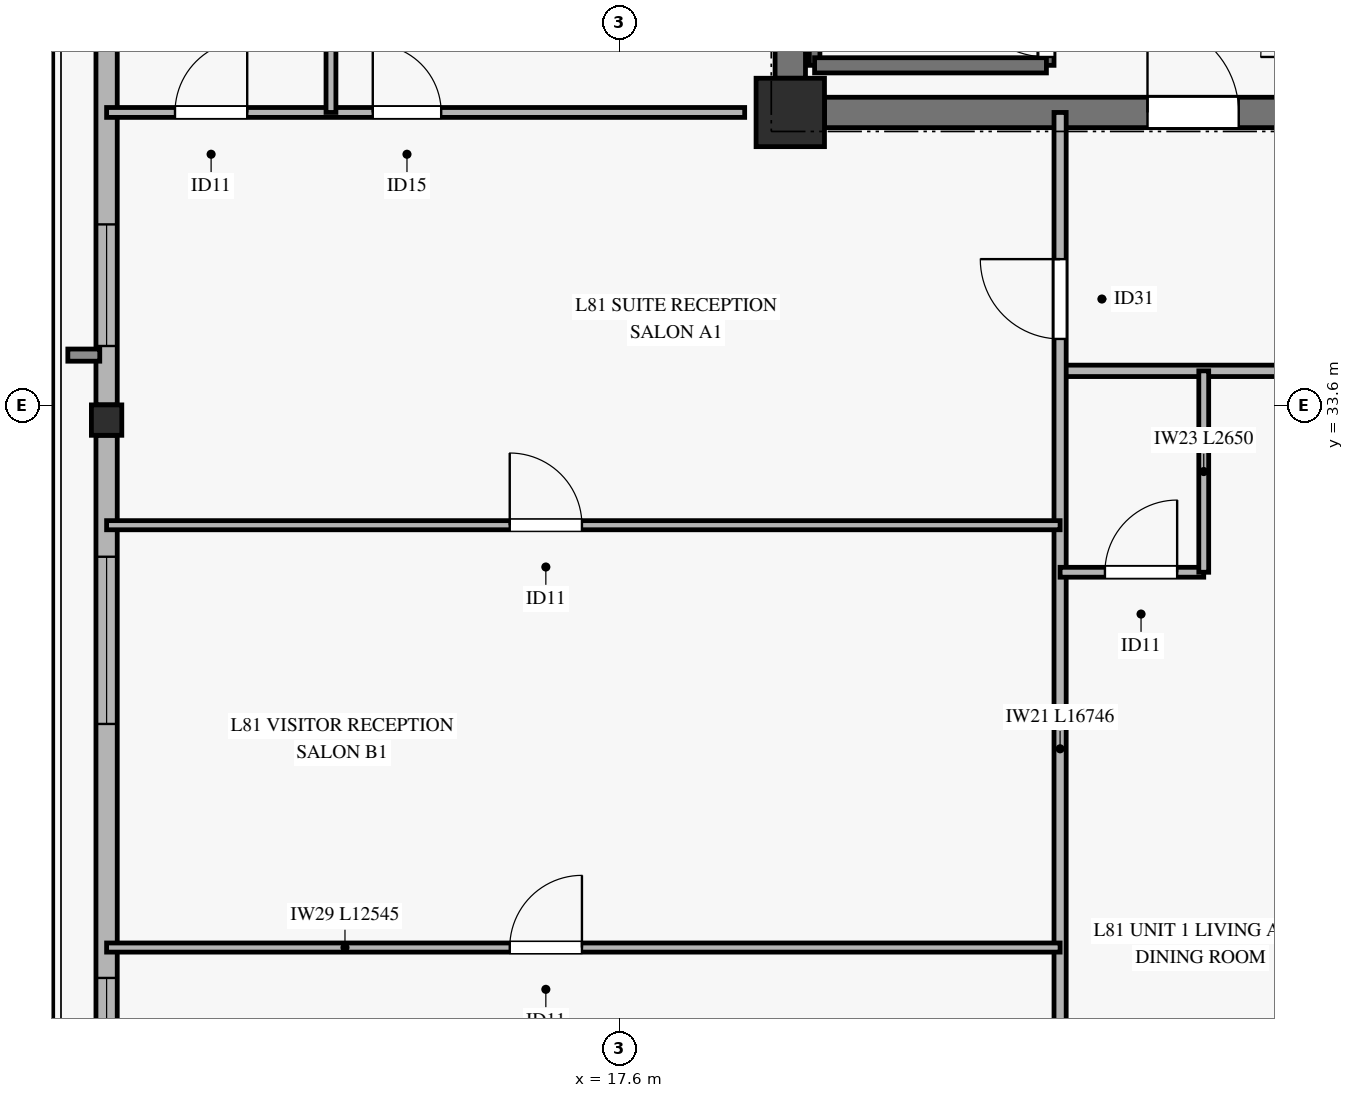
"""IFC4 building model, lengths in metres.
Left out: names, types, materials, properties, quantities, classifications, styles, units other than length and angle.
Written with IfcOpenShell. Run it as: python <this file> out.ifc"""

import sys

from ifc_helpers import new_model, si_unit, direction, frame, frame_2d, origin, origin_2d, place, context, subcontext, project, spatial, rectangle, hollow_rectangle, extrude, source, transform, mapped, element, fill, save


model = new_model("IFC4")
c1 = context("Model", 3, precision=1e-05, world=origin(), true_north=direction((0.0, 1.0)))
c2 = subcontext(c1, "Body", "Model", "MODEL_VIEW")
j1 = project(units=[si_unit("LENGTHUNIT", "METRE"), si_unit("PLANEANGLEUNIT", "RADIAN")], contexts=[c1])
p1 = place(None, origin())
s1 = spatial("IfcSite", under=j1, at=p1, CompositionType="ELEMENT")
p2 = place(p1, origin())
s2 = spatial("IfcBuilding", under=s1, at=p2, CompositionType="ELEMENT")
p3 = place(p2, frame((0.0, 0.0, 314.2)))
s3 = spatial("IfcBuildingStorey", under=s2, at=p3, CompositionType="ELEMENT", Elevation=314.2)
m1 = source(origin(), c2, "Body", "SweptSolid", [
    extrude(rectangle(XDim=0.9, YDim=0.9, at=origin_2d()), origin(), (0.0, 0.0, 1.0), 3.185),
])
p4 = place(p3, frame((19.85, 37.45, 0.0), z_axis=(0.0, 0.0, 1.0), x_axis=(1.0, 0.0, 0.0)))
e1 = element("IfcColumn", 1, at=p4, inside=s3, PredefinedType="PILASTER", context=c2, shape_type="MappedRepresentation", body=[
    mapped(m1, transform((0.0, 0.0, 0.0), x_axis=(1.0, 0.0, 0.0), y_axis=(0.0, 1.0, 0.0), z_axis=(0.0, 0.0, 1.0), scale=1.0)),
])
p5 = place(p3, frame((20.3, 37.45, 0.0), z_axis=(0.0, 0.0, 1.0), x_axis=(1.0, 0.0, 0.0)))
e2 = element("IfcWall", 2, at=p5, inside=s3, PredefinedType="SHEAR", context=c2, shape_type="SweptSolid", body=[
    extrude(rectangle(XDim=10.05, YDim=0.4, at=frame_2d((5.025, 0.0))), origin(), (0.0, 0.0, 1.0), 3.185),
])
p6 = place(p5, frame((4.25, 0.0, 0.0)))
e3 = element("IfcOpeningElement", 3, at=p6, cuts=e2, PredefinedType="OPENING", context=c2, shape_type="SweptSolid", body=[
    extrude(rectangle(XDim=1.2, YDim=2.15, at=frame_2d((0.6, 1.075))), frame((0.0, 0.21, 0.0), z_axis=(0.0, -1.0, 0.0), x_axis=(1.0, 0.0, 0.0)), (0.0, 0.0, 1.0), 0.42),
])
p7 = place(p3, frame((19.85, 37.9, 0.0), z_axis=(0.0, 0.0, 1.0), x_axis=(0.0, 1.0, 0.0)))
e4 = element("IfcWall", 4, at=p7, inside=s3, PredefinedType="SHEAR", context=c2, shape_type="SweptSolid", body=[
    extrude(rectangle(XDim=8.2, YDim=0.4, at=frame_2d((4.1, 0.0))), origin(), (0.0, 0.0, 1.0), 3.185),
])
m2 = source(origin(), c2, "Body", "SweptSolid", [
    extrude(hollow_rectangle(XDim=0.4, YDim=0.4, WallThickness=0.02, at=origin_2d()), origin(), (0.0, 0.0, 1.0), 3.185),
])
p8 = place(p3, frame((10.855, 33.402, 0.0), z_axis=(0.0, 0.0, 1.0), x_axis=(1.0, 0.0, 0.0)))
e5 = element("IfcColumn", 5, at=p8, inside=s3, PredefinedType="COLUMN", context=c2, shape_type="MappedRepresentation", body=[
    mapped(m2, transform((0.0, 0.0, 0.0), x_axis=(1.0, 0.0, 0.0), y_axis=(0.0, 1.0, 0.0), z_axis=(0.0, 0.0, 1.0), scale=1.0)),
])
p9 = place(p3, frame((10.855, 23.042, 0.0), z_axis=(0.0, 0.0, 1.0), x_axis=(0.0, 1.0, 0.0)))
e6 = element("IfcWall", 6, at=p9, inside=s3, PredefinedType="SOLIDWALL", context=c2, shape_type="SweptSolid", body=[
    extrude(rectangle(XDim=10.16, YDim=0.28, at=frame_2d((5.08, 0.0))), origin(), (0.0, 0.0, 1.0), 2.815),
])
p10 = place(p9, frame((0.82, 0.0, 0.45)))
e7 = element("IfcOpeningElement", 7, at=p10, cuts=e6, PredefinedType="OPENING", context=c2, shape_type="SweptSolid", body=[
    extrude(rectangle(XDim=2.2, YDim=2.1, at=frame_2d((1.1, 1.05))), frame((0.0, 0.15, 0.0), z_axis=(0.0, -1.0, 0.0), x_axis=(1.0, 0.0, 0.0)), (0.0, 0.0, 1.0), 0.3),
])
p11 = place(p9, frame((6.362, 0.0, 0.45)))
e8 = element("IfcOpeningElement", 8, at=p11, cuts=e6, PredefinedType="OPENING", context=c2, shape_type="SweptSolid", body=[
    extrude(rectangle(XDim=2.2, YDim=2.1, at=frame_2d((1.1, 1.05))), frame((0.0, 0.15, 0.0), z_axis=(0.0, -1.0, 0.0), x_axis=(1.0, 0.0, 0.0)), (0.0, 0.0, 1.0), 0.3),
])
p12 = place(p3, frame((10.855, 33.602, 0.0), z_axis=(0.0, 0.0, 1.0), x_axis=(0.0, 1.0, 0.0)))
e9 = element("IfcWall", 9, at=p12, inside=s3, PredefinedType="SOLIDWALL", context=c2, shape_type="SweptSolid", body=[
    extrude(rectangle(XDim=10.16, YDim=0.28, at=frame_2d((5.08, 0.0))), origin(), (0.0, 0.0, 1.0), 2.815),
])
p13 = place(p12, frame((0.775, 0.0, 0.45)))
e10 = element("IfcOpeningElement", 10, at=p13, cuts=e9, PredefinedType="OPENING", context=c2, shape_type="SweptSolid", body=[
    extrude(rectangle(XDim=1.6, YDim=2.0, at=frame_2d((0.8, 1.0))), frame((0.0, 0.15, 0.0), z_axis=(0.0, -1.0, 0.0), x_axis=(1.0, 0.0, 0.0)), (0.0, 0.0, 1.0), 0.3),
])
p14 = place(p3, frame((20.17, 38.07, 0.0), z_axis=(0.0, 0.0, 1.0), x_axis=(0.0, 1.0, 0.0)))
e11 = element("IfcWall", 11, at=p14, inside=s3, PredefinedType="SOLIDWALL", context=c2, shape_type="SweptSolid", body=[
    extrude(rectangle(XDim=7.25, YDim=0.14, at=frame_2d((3.625, 0.0))), origin(), (0.0, 0.0, 1.0), 3.4),
])
p15 = place(p3, frame((23.22, 38.07, 0.0), z_axis=(0.0, 0.0, 1.0), x_axis=(0.0, 1.0, 0.0)))
e12 = element("IfcWall", 12, at=p15, inside=s3, PredefinedType="SOLIDWALL", context=c2, shape_type="SweptSolid", body=[
    extrude(rectangle(XDim=7.25, YDim=0.2, at=frame_2d((3.625, 0.0))), origin(), (0.0, 0.0, 1.0), 3.4),
])
p16 = place(p15, frame((0.11, 0.0, 0.0)))
e13 = element("IfcOpeningElement", 13, at=p16, cuts=e12, PredefinedType="OPENING", context=c2, shape_type="SweptSolid", body=[
    extrude(rectangle(XDim=1.1, YDim=2.15, at=frame_2d((0.55, 1.075))), frame((0.0, 0.11, 0.0), z_axis=(0.0, -1.0, 0.0), x_axis=(1.0, 0.0, 0.0)), (0.0, 0.0, 1.0), 0.22),
])
p17 = place(p3, frame((20.17, 38.07, 0.0), z_axis=(0.0, 0.0, 1.0), x_axis=(1.0, 0.0, 0.0)))
e14 = element("IfcWall", 14, at=p17, inside=s3, PredefinedType="SOLIDWALL", context=c2, shape_type="SweptSolid", body=[
    extrude(rectangle(XDim=3.05, YDim=0.2, at=frame_2d((1.525, 0.0))), origin(), (0.0, 0.0, 1.0), 3.4),
])
p18 = place(p3, frame((23.4, 34.05, 0.0), z_axis=(0.0, 0.0, 1.0), x_axis=(1.0, 0.0, 0.0)))
e15 = element("IfcWall", 15, at=p18, inside=s3, PredefinedType="PARTITIONING", context=c2, shape_type="SweptSolid", body=[
    extrude(rectangle(XDim=20.9, YDim=0.15, at=frame_2d((10.45, 0.0))), origin(), (0.0, 0.0, 1.0), 2.47),
])
p19 = place(p18, frame((3.275, 0.0, 0.0)))
e16 = element("IfcOpeningElement", 16, at=p19, cuts=e15, PredefinedType="OPENING", context=c2, shape_type="SweptSolid", body=[
    extrude(rectangle(XDim=1.05, YDim=2.15, at=frame_2d((0.525, 1.075))), frame((0.0, 0.085, 0.0), z_axis=(0.0, -1.0, 0.0), x_axis=(1.0, 0.0, 0.0)), (0.0, 0.0, 1.0), 0.17),
])
p20 = place(p18, frame((10.775, 0.0, 0.0)))
e17 = element("IfcOpeningElement", 17, at=p20, cuts=e15, PredefinedType="OPENING", context=c2, shape_type="SweptSolid", body=[
    extrude(rectangle(XDim=1.05, YDim=2.15, at=frame_2d((0.525, 1.075))), frame((0.0, 0.085, 0.0), z_axis=(0.0, -1.0, 0.0), x_axis=(1.0, 0.0, 0.0)), (0.0, 0.0, 1.0), 0.17),
])
p21 = place(p18, frame((17.525, 0.0, 0.0)))
e18 = element("IfcOpeningElement", 18, at=p21, cuts=e15, PredefinedType="OPENING", context=c2, shape_type="SweptSolid", body=[
    extrude(rectangle(XDim=1.05, YDim=2.15, at=frame_2d((0.525, 1.075))), frame((0.0, 0.085, 0.0), z_axis=(0.0, -1.0, 0.0), x_axis=(1.0, 0.0, 0.0)), (0.0, 0.0, 1.0), 0.17),
])
p22 = place(p3, frame((23.4, 20.704, 0.0), z_axis=(0.0, 0.0, 1.0), x_axis=(0.0, 1.0, 0.0)))
e19 = element("IfcWall", 19, at=p22, inside=s3, PredefinedType="PARTITIONING", context=c2, shape_type="SweptSolid", body=[
    extrude(rectangle(XDim=16.746, YDim=0.16, at=frame_2d((8.373, 0.0))), origin(), (0.0, 0.0, 1.0), 2.77),
])
p23 = place(p22, frame((13.766, 0.0, 0.0)))
e20 = element("IfcOpeningElement", 20, at=p23, cuts=e19, PredefinedType="OPENING", context=c2, shape_type="SweptSolid", body=[
    extrude(rectangle(XDim=1.05, YDim=2.15, at=frame_2d((0.525, 1.075))), frame((0.0, 0.09, 0.0), z_axis=(0.0, -1.0, 0.0), x_axis=(1.0, 0.0, 0.0)), (0.0, 0.0, 1.0), 0.18),
])
p24 = place(p3, frame((10.855, 26.462, 0.0), z_axis=(0.0, 0.0, 1.0), x_axis=(1.0, 0.0, 0.0)))
e21 = element("IfcWall", 21, at=p24, inside=s3, PredefinedType="PARTITIONING", context=c2, shape_type="SweptSolid", body=[
    extrude(rectangle(XDim=12.545, YDim=0.12, at=frame_2d((6.272, 0.0))), origin(), (0.0, 0.0, 1.0), 2.47),
])
p25 = place(p24, frame((5.304, 0.0, 0.0)))
e22 = element("IfcOpeningElement", 22, at=p25, cuts=e21, PredefinedType="OPENING", context=c2, shape_type="SweptSolid", body=[
    extrude(rectangle(XDim=0.95, YDim=2.1, at=frame_2d((0.475, 1.05))), frame((0.0, 0.07, 0.0), z_axis=(0.0, -1.0, 0.0), x_axis=(1.0, 0.0, 0.0)), (0.0, 0.0, 1.0), 0.14),
])
p26 = place(p3, frame((10.855, 32.019, 0.0), z_axis=(0.0, 0.0, 1.0), x_axis=(1.0, 0.0, 0.0)))
e23 = element("IfcWall", 23, at=p26, inside=s3, PredefinedType="PARTITIONING", context=c2, shape_type="SweptSolid", body=[
    extrude(rectangle(XDim=12.545, YDim=0.12, at=frame_2d((6.272, 0.0))), origin(), (0.0, 0.0, 1.0), 2.47),
])
p27 = place(p26, frame((5.304, 0.0, 0.0)))
e24 = element("IfcOpeningElement", 24, at=p27, cuts=e23, PredefinedType="OPENING", context=c2, shape_type="SweptSolid", body=[
    extrude(rectangle(XDim=0.95, YDim=2.1, at=frame_2d((0.475, 1.05))), frame((0.0, 0.07, 0.0), z_axis=(0.0, -1.0, 0.0), x_axis=(1.0, 0.0, 0.0)), (0.0, 0.0, 1.0), 0.14),
])
p28 = place(p3, frame((23.4, 31.4, 0.0), z_axis=(0.0, 0.0, 1.0), x_axis=(1.0, 0.0, 0.0)))
e25 = element("IfcWall", 25, at=p28, inside=s3, PredefinedType="PARTITIONING", context=c2, shape_type="SweptSolid", body=[
    extrude(rectangle(XDim=1.89, YDim=0.13, at=frame_2d((0.945, 0.0))), origin(), (0.0, 0.0, 1.0), 3.185),
])
p29 = place(p28, frame((0.59, 0.0, 0.0)))
e26 = element("IfcOpeningElement", 26, at=p29, cuts=e25, PredefinedType="OPENING", context=c2, shape_type="SweptSolid", body=[
    extrude(rectangle(XDim=0.95, YDim=2.1, at=frame_2d((0.475, 1.05))), frame((0.0, 0.075, 0.0), z_axis=(0.0, -1.0, 0.0), x_axis=(1.0, 0.0, 0.0)), (0.0, 0.0, 1.0), 0.15),
])
p30 = place(p3, frame((25.29, 31.4, 0.0), z_axis=(0.0, 0.0, 1.0), x_axis=(0.0, 1.0, 0.0)))
e27 = element("IfcWall", 27, at=p30, inside=s3, PredefinedType="PARTITIONING", context=c2, shape_type="SweptSolid", body=[
    extrude(rectangle(XDim=2.65, YDim=0.13, at=frame_2d((1.325, 0.0))), origin(), (0.0, 0.0, 1.0), 2.77),
])
p31 = place(p3, frame((10.855, 37.45, 0.0), z_axis=(0.0, 0.0, 1.0), x_axis=(1.0, 0.0, 0.0)))
e28 = element("IfcWall", 28, at=p31, inside=s3, PredefinedType="PARTITIONING", context=c2, shape_type="SweptSolid", body=[
    extrude(rectangle(XDim=8.395, YDim=0.13, at=frame_2d((4.198, 0.0))), origin(), (0.0, 0.0, 1.0), 2.82),
])
p32 = place(p31, frame((0.9, 0.0, 0.0)))
e29 = element("IfcOpeningElement", 29, at=p32, cuts=e28, PredefinedType="OPENING", context=c2, shape_type="SweptSolid", body=[
    extrude(rectangle(XDim=0.95, YDim=2.1, at=frame_2d((0.475, 1.05))), frame((0.0, 0.075, 0.0), z_axis=(0.0, -1.0, 0.0), x_axis=(1.0, 0.0, 0.0)), (0.0, 0.0, 1.0), 0.15),
])
p33 = place(p31, frame((3.502, 0.0, 0.0)))
e30 = element("IfcOpeningElement", 30, at=p33, cuts=e28, PredefinedType="OPENING", context=c2, shape_type="SweptSolid", body=[
    extrude(rectangle(XDim=0.9, YDim=2.1, at=frame_2d((0.45, 1.05))), frame((0.0, 0.075, 0.0), z_axis=(0.0, -1.0, 0.0), x_axis=(1.0, 0.0, 0.0)), (0.0, 0.0, 1.0), 0.15),
])
p34 = place(p3, frame((13.807, 37.45, 0.0), z_axis=(0.0, 0.0, 1.0), x_axis=(0.0, 1.0, 0.0)))
e31 = element("IfcWall", 31, at=p34, inside=s3, PredefinedType="PARTITIONING", context=c2, shape_type="SweptSolid", body=[
    extrude(rectangle(XDim=8.8, YDim=0.13, at=frame_2d((4.4, 0.0))), origin(), (0.0, 0.0, 1.0), 3.185),
])
m3 = source(origin(), c2, "Body", "SweptSolid", [
    extrude(rectangle(XDim=2.2, YDim=2.1, at=frame_2d((1.1, 1.05))), frame((0.0, 0.03, 0.0), z_axis=(0.0, -1.0, 0.0), x_axis=(1.0, 0.0, 0.0)), (0.0, 0.0, 1.0), 0.06),
])
p35 = place(p10, origin())
e32 = element("IfcWindow", 32, at=p35, inside=s3, PartitioningType="SINGLE_PANEL", PredefinedType="WINDOW", context=c2, shape_type="MappedRepresentation", body=[
    mapped(m3, transform((0.0, 0.0, 0.0), x_axis=(1.0, 0.0, 0.0), y_axis=(0.0, 1.0, 0.0), z_axis=(0.0, 0.0, 1.0), scale=1.0)),
])
fill(e7, e32)
p36 = place(p11, origin())
e33 = element("IfcWindow", 33, at=p36, inside=s3, PartitioningType="SINGLE_PANEL", PredefinedType="WINDOW", context=c2, shape_type="MappedRepresentation", body=[
    mapped(m3, transform((0.0, 0.0, 0.0), x_axis=(1.0, 0.0, 0.0), y_axis=(0.0, 1.0, 0.0), z_axis=(0.0, 0.0, 1.0), scale=1.0)),
])
fill(e8, e33)
m4 = source(origin(), c2, "Body", "SweptSolid", [
    extrude(rectangle(XDim=1.6, YDim=2.0, at=frame_2d((0.8, 1.0))), frame((0.0, 0.03, 0.0), z_axis=(0.0, -1.0, 0.0), x_axis=(1.0, 0.0, 0.0)), (0.0, 0.0, 1.0), 0.06),
])
p37 = place(p13, origin())
e34 = element("IfcWindow", 34, at=p37, inside=s3, PartitioningType="SINGLE_PANEL", PredefinedType="WINDOW", context=c2, shape_type="MappedRepresentation", body=[
    mapped(m4, transform((0.0, 0.0, 0.0), x_axis=(1.0, 0.0, 0.0), y_axis=(0.0, 1.0, 0.0), z_axis=(0.0, 0.0, 1.0), scale=1.0)),
])
fill(e10, e34)
m5 = source(origin(), c2, "Body", "SweptSolid", [
    extrude(rectangle(XDim=1.1, YDim=2.15, at=frame_2d((0.55, 1.075))), frame((0.0, 0.025, 0.0), z_axis=(0.0, -1.0, 0.0), x_axis=(1.0, 0.0, 0.0)), (0.0, 0.0, 1.0), 0.05),
])
p38 = place(p16, origin())
e35 = element("IfcDoor", 35, at=p38, inside=s3, OperationType="SINGLE_SWING_RIGHT", PredefinedType="DOOR", context=c2, shape_type="MappedRepresentation", body=[
    mapped(m5, transform((0.0, 0.0, 0.0), x_axis=(1.0, 0.0, 0.0), y_axis=(0.0, 1.0, 0.0), z_axis=(0.0, 0.0, 1.0), scale=1.0)),
])
fill(e13, e35)
m6 = source(origin(), c2, "Body", "SweptSolid", [
    extrude(rectangle(XDim=1.2, YDim=2.15, at=frame_2d((0.6, 1.075))), frame((0.0, 0.025, 0.0), z_axis=(0.0, -1.0, 0.0), x_axis=(1.0, 0.0, 0.0)), (0.0, 0.0, 1.0), 0.05),
])
p39 = place(p6, origin())
e36 = element("IfcDoor", 36, at=p39, inside=s3, OperationType="SINGLE_SWING_LEFT", PredefinedType="DOOR", context=c2, shape_type="MappedRepresentation", body=[
    mapped(m6, transform((0.0, 0.0, 0.0), x_axis=(1.0, 0.0, 0.0), y_axis=(0.0, 1.0, 0.0), z_axis=(0.0, 0.0, 1.0), scale=1.0)),
])
fill(e3, e36)
m7 = source(origin(), c2, "Body", "SweptSolid", [
    extrude(rectangle(XDim=1.05, YDim=2.15, at=frame_2d((0.525, 1.075))), frame((0.0, 0.025, 0.0), z_axis=(0.0, -1.0, 0.0), x_axis=(1.0, 0.0, 0.0)), (0.0, 0.0, 1.0), 0.05),
])
p40 = place(p23, origin())
e37 = element("IfcDoor", 37, at=p40, inside=s3, OperationType="SINGLE_SWING_RIGHT", PredefinedType="DOOR", context=c2, shape_type="MappedRepresentation", body=[
    mapped(m7, transform((0.0, 0.0, 0.0), x_axis=(1.0, 0.0, 0.0), y_axis=(0.0, 1.0, 0.0), z_axis=(0.0, 0.0, 1.0), scale=1.0)),
])
fill(e20, e37)
m8 = source(origin(), c2, "Body", "SweptSolid", [
    extrude(rectangle(XDim=0.95, YDim=2.1, at=frame_2d((0.475, 1.05))), frame((0.0, 0.025, 0.0), z_axis=(0.0, -1.0, 0.0), x_axis=(1.0, 0.0, 0.0)), (0.0, 0.0, 1.0), 0.05),
])
p41 = place(p27, origin())
e38 = element("IfcDoor", 38, at=p41, inside=s3, OperationType="SINGLE_SWING_LEFT", PredefinedType="DOOR", context=c2, shape_type="MappedRepresentation", body=[
    mapped(m8, transform((0.0, 0.0, 0.0), x_axis=(1.0, 0.0, 0.0), y_axis=(0.0, 1.0, 0.0), z_axis=(0.0, 0.0, 1.0), scale=1.0)),
])
fill(e24, e38)
p42 = place(p25, origin())
e39 = element("IfcDoor", 39, at=p42, inside=s3, OperationType="SINGLE_SWING_RIGHT", PredefinedType="DOOR", context=c2, shape_type="MappedRepresentation", body=[
    mapped(m8, transform((0.0, 0.0, 0.0), x_axis=(1.0, 0.0, 0.0), y_axis=(0.0, 1.0, 0.0), z_axis=(0.0, 0.0, 1.0), scale=1.0)),
])
fill(e22, e39)
p43 = place(p29, origin())
e40 = element("IfcDoor", 40, at=p43, inside=s3, OperationType="SINGLE_SWING_RIGHT", PredefinedType="DOOR", context=c2, shape_type="MappedRepresentation", body=[
    mapped(m8, transform((0.0, 0.0, 0.0), x_axis=(1.0, 0.0, 0.0), y_axis=(0.0, 1.0, 0.0), z_axis=(0.0, 0.0, 1.0), scale=1.0)),
])
fill(e26, e40)
p44 = place(p32, origin())
e41 = element("IfcDoor", 41, at=p44, inside=s3, OperationType="SINGLE_SWING_RIGHT", PredefinedType="DOOR", context=c2, shape_type="MappedRepresentation", body=[
    mapped(m8, transform((0.0, 0.0, 0.0), x_axis=(1.0, 0.0, 0.0), y_axis=(0.0, 1.0, 0.0), z_axis=(0.0, 0.0, 1.0), scale=1.0)),
])
fill(e29, e41)
m9 = source(origin(), c2, "Body", "SweptSolid", [
    extrude(rectangle(XDim=0.9, YDim=2.1, at=frame_2d((0.45, 1.05))), frame((0.0, 0.025, 0.0), z_axis=(0.0, -1.0, 0.0), x_axis=(1.0, 0.0, 0.0)), (0.0, 0.0, 1.0), 0.05),
])
p45 = place(p33, origin())
e42 = element("IfcDoor", 42, at=p45, inside=s3, OperationType="SINGLE_SWING_LEFT", PredefinedType="DOOR", context=c2, shape_type="MappedRepresentation", body=[
    mapped(m9, transform((0.0, 0.0, 0.0), x_axis=(1.0, 0.0, 0.0), y_axis=(0.0, 1.0, 0.0), z_axis=(0.0, 0.0, 1.0), scale=1.0)),
])
fill(e30, e42)
save(model, sys.argv[1])
